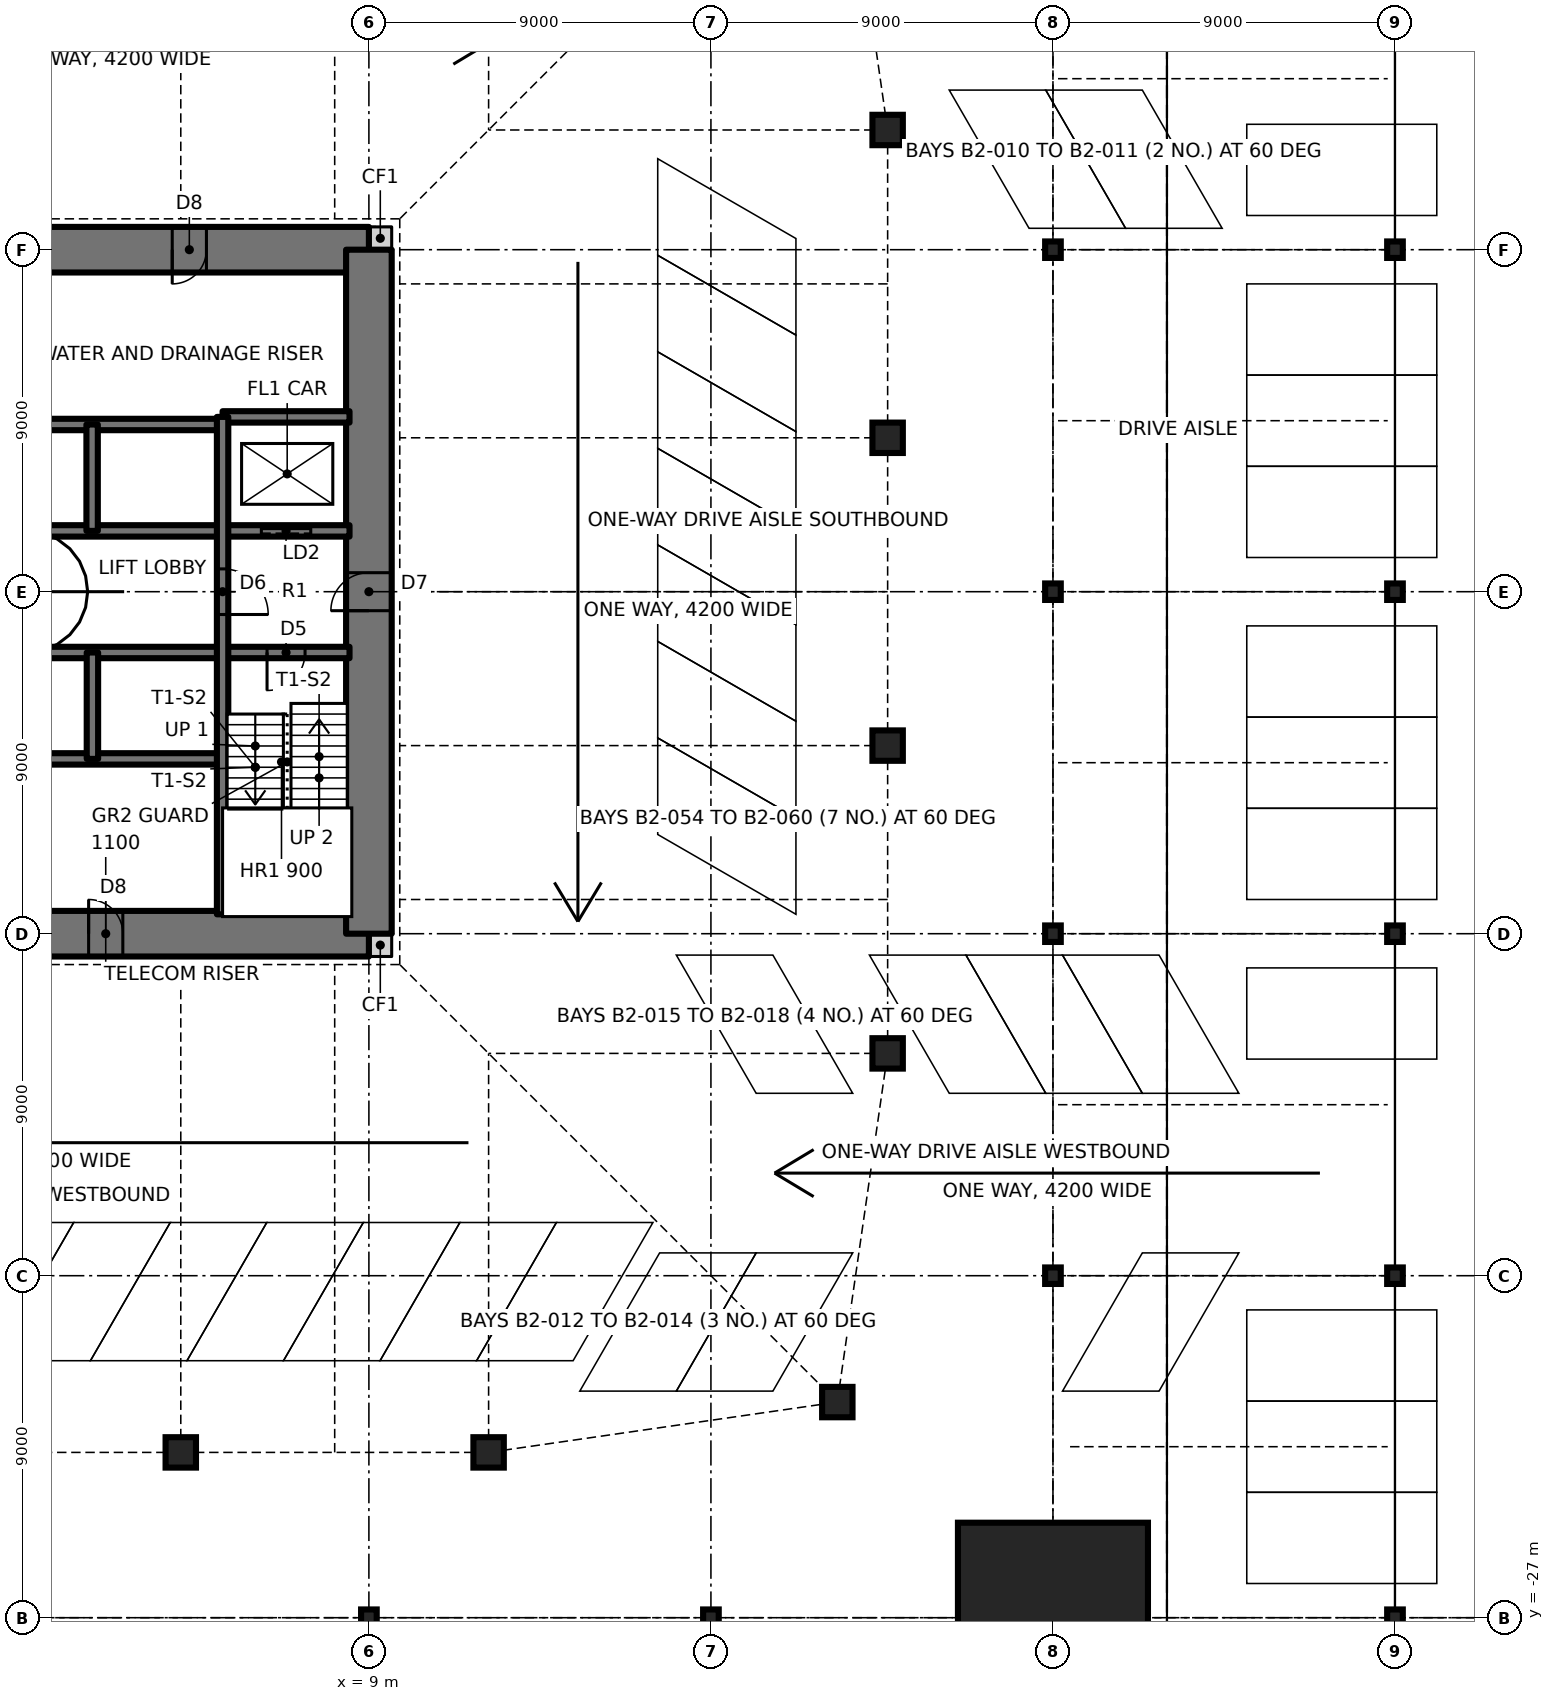
"""IFC4 building model, lengths in metres.
Left out: names, types, materials, properties, quantities, classifications, styles, units other than length and angle.
Written with IfcOpenShell. Run it as: python <this file> out.ifc"""

import sys

from ifc_helpers import new_model, si_unit, direction, frame, frame_2d, origin, origin_2d, place, context, subcontext, project, spatial, rectangle, hollow_rectangle, i_section, extrude, element, fill, save


model = new_model("IFC4")
c1 = context("Model", 3, precision=1e-05, world=origin(), true_north=direction((0.0, 1.0)))
c2 = subcontext(c1, "Body", "Model", "MODEL_VIEW")
j1 = project(units=[si_unit("LENGTHUNIT", "METRE"), si_unit("PLANEANGLEUNIT", "RADIAN")], contexts=[c1])
p1 = place(None, origin())
s1 = spatial("IfcSite", under=j1, at=p1, CompositionType="ELEMENT")
p2 = place(p1, origin())
s2 = spatial("IfcBuilding", under=s1, at=p2, CompositionType="ELEMENT")
p3 = place(p2, frame((0.0, 0.0, -7.2)))
s3 = spatial("IfcBuildingStorey", under=s2, at=p3, CompositionType="ELEMENT", Elevation=-7.2)
for number, where, z_axis, x_axis in (
    (1, (4.05, -22.65, -1.8), (0.0, 0.0, 1.0), (1.0, 0.0, 0.0)),
    (2, (12.15, -22.65, -1.8), (0.0, 0.0, 1.0), (1.0, 0.0, 0.0)),
    (3, (21.326, -21.326, -1.8), (0.0, 0.0, 1.0), (1.0, 0.0, 0.0)),
    (4, (22.65, -12.15, -1.8), (0.0, 0.0, 1.0), (1.0, 0.0, 0.0)),
    (5, (22.65, -4.05, -1.8), (0.0, 0.0, 1.0), (1.0, 0.0, 0.0)),
    (6, (22.65, 4.05, -1.8), (0.0, 0.0, 1.0), (1.0, 0.0, 0.0)),
    (7, (22.65, 12.15, -1.8), (0.0, 0.0, 1.0), (1.0, 0.0, 0.0)),
):
    element("IfcColumn", number, at=place(p3, frame(where, z_axis=z_axis, x_axis=x_axis)), inside=s3, PredefinedType="COLUMN", context=c2, shape_type="SweptSolid", body=[
        extrude(hollow_rectangle(XDim=0.8, YDim=0.8, WallThickness=0.09, at=origin_2d()), origin(), (0.0, 0.0, 1.0), 5.4),
    ])
p4 = place(p3, frame((27.0, -27.0, -1.8), z_axis=(0.0, 0.0, 1.0), x_axis=(1.0, 0.0, 0.0)))
e8 = element("IfcColumn", 8, at=p4, inside=s3, PredefinedType="COLUMN", context=c2, shape_type="SweptSolid", body=[
    extrude(rectangle(XDim=5.0, YDim=5.0, at=origin_2d()), origin(), (0.0, 0.0, 1.0), 5.4),
    extrude(i_section(OverallWidth=0.478, OverallDepth=0.599, WebThickness=0.1, FlangeThickness=0.14, at=origin_2d()), origin(), (0.0, 0.0, 1.0), 5.4),
])
for number, where, z_axis, x_axis in (
    (9, (9.0, -27.0, -1.8), (0.0, 0.0, 1.0), (1.0, 0.0, 0.0)),
    (10, (18.0, -27.0, -1.8), (0.0, 0.0, 1.0), (1.0, 0.0, 0.0)),
    (11, (27.0, -18.0, -1.8), (0.0, 0.0, 1.0), (1.0, 0.0, 0.0)),
    (12, (27.0, -9.0, -1.8), (0.0, 0.0, 1.0), (1.0, 0.0, 0.0)),
    (13, (27.0, 0.0, -1.8), (0.0, 0.0, 1.0), (1.0, 0.0, 0.0)),
    (14, (27.0, 9.0, -1.8), (0.0, 0.0, 1.0), (1.0, 0.0, 0.0)),
):
    element("IfcColumn", number, at=place(p3, frame(where, z_axis=z_axis, x_axis=x_axis)), inside=s3, PredefinedType="COLUMN", context=c2, shape_type="SweptSolid", body=[
        extrude(i_section(OverallWidth=0.411, OverallDepth=0.434, WebThickness=0.036, FlangeThickness=0.057, at=origin_2d()), origin(), (0.0, 0.0, 1.0), 5.4),
    ])
for number, where, z_axis, x_axis in (
    (15, (36.0, -27.0, -0.25), (0.0, 0.0, 1.0), (1.0, 0.0, 0.0)),
    (16, (36.0, -18.0, -0.25), (0.0, 0.0, 1.0), (1.0, 0.0, 0.0)),
    (17, (36.0, -9.0, -0.25), (0.0, 0.0, 1.0), (1.0, 0.0, 0.0)),
    (18, (36.0, 0.0, -0.25), (0.0, 0.0, 1.0), (1.0, 0.0, 0.0)),
    (19, (36.0, 9.0, -0.25), (0.0, 0.0, 1.0), (1.0, 0.0, 0.0)),
):
    element("IfcColumn", number, at=place(p3, frame(where, z_axis=z_axis, x_axis=x_axis)), inside=s3, PredefinedType="COLUMN", context=c2, shape_type="SweptSolid", body=[
        extrude(i_section(OverallWidth=0.411, OverallDepth=0.434, WebThickness=0.036, FlangeThickness=0.057, at=origin_2d()), origin(), (0.0, 0.0, 1.0), 3.85),
    ])
for number, where, z_axis, x_axis in (
    (20, (9.0, -9.3, -1.8), (0.0, 0.0, 1.0), (1.0, 0.0, 0.0)),
    (21, (9.0, 9.3, -1.8), (0.0, 0.0, 1.0), (1.0, 0.0, 0.0)),
):
    element("IfcWall", number, at=place(p3, frame(where, z_axis=z_axis, x_axis=x_axis)), inside=s3, PredefinedType="SOLIDWALL", context=c2, shape_type="SweptSolid", body=[
        extrude(rectangle(XDim=0.6, YDim=0.6, at=frame_2d((0.3, 0.0))), origin(), (0.0, 0.0, 1.0), 5.4),
    ])
p5 = place(p3, frame((-9.0, -9.0, -1.8), z_axis=(0.0, 0.0, 1.0), x_axis=(1.0, 0.0, 0.0)))
e22 = element("IfcWall", 22, at=p5, inside=s3, PredefinedType="SHEAR", context=c2, shape_type="SweptSolid", body=[
    extrude(rectangle(XDim=18.0, YDim=1.2, at=frame_2d((9.0, 0.0))), origin(), (0.0, 0.0, 1.0), 5.4),
])
p6 = place(p5, frame((3.775, 0.0, 1.8)))
e23 = element("IfcOpeningElement", 23, at=p6, cuts=e22, PredefinedType="OPENING", context=c2, shape_type="SweptSolid", body=[
    extrude(rectangle(XDim=0.9, YDim=2.1, at=frame_2d((0.45, 1.05))), frame((0.0, 0.61, 0.0), z_axis=(0.0, -1.0, 0.0), x_axis=(1.0, 0.0, 0.0)), (0.0, 0.0, 1.0), 1.22),
])
p7 = place(p5, frame((10.625, 0.0, 1.8)))
e24 = element("IfcOpeningElement", 24, at=p7, cuts=e22, PredefinedType="OPENING", context=c2, shape_type="SweptSolid", body=[
    extrude(rectangle(XDim=0.9, YDim=2.1, at=frame_2d((0.45, 1.05))), frame((0.0, 0.61, 0.0), z_axis=(0.0, -1.0, 0.0), x_axis=(1.0, 0.0, 0.0)), (0.0, 0.0, 1.0), 1.22),
])
p8 = place(p3, frame((9.0, 9.0, -1.8), z_axis=(0.0, 0.0, 1.0), x_axis=(-1.0, 0.0, 0.0)))
e25 = element("IfcWall", 25, at=p8, inside=s3, PredefinedType="SHEAR", context=c2, shape_type="SweptSolid", body=[
    extrude(rectangle(XDim=18.0, YDim=1.2, at=frame_2d((9.0, 0.0))), origin(), (0.0, 0.0, 1.0), 5.4),
])
p9 = place(p8, frame((11.125, 0.0, 1.8)))
e26 = element("IfcOpeningElement", 26, at=p9, cuts=e25, PredefinedType="OPENING", context=c2, shape_type="SweptSolid", body=[
    extrude(rectangle(XDim=0.9, YDim=2.1, at=frame_2d((0.45, 1.05))), frame((0.0, 0.61, 0.0), z_axis=(0.0, -1.0, 0.0), x_axis=(1.0, 0.0, 0.0)), (0.0, 0.0, 1.0), 1.22),
])
p10 = place(p8, frame((4.275, 0.0, 1.8)))
e27 = element("IfcOpeningElement", 27, at=p10, cuts=e25, PredefinedType="OPENING", context=c2, shape_type="SweptSolid", body=[
    extrude(rectangle(XDim=0.9, YDim=2.1, at=frame_2d((0.45, 1.05))), frame((0.0, 0.61, 0.0), z_axis=(0.0, -1.0, 0.0), x_axis=(1.0, 0.0, 0.0)), (0.0, 0.0, 1.0), 1.22),
])
p11 = place(p3, frame((9.0, -9.0, -1.8), z_axis=(0.0, 0.0, 1.0), x_axis=(0.0, 1.0, 0.0)))
e28 = element("IfcWall", 28, at=p11, inside=s3, PredefinedType="SHEAR", context=c2, shape_type="SweptSolid", body=[
    extrude(rectangle(XDim=18.0, YDim=1.2, at=frame_2d((9.0, 0.0))), origin(), (0.0, 0.0, 1.0), 5.4),
])
p12 = place(p11, frame((8.5, 0.0, 1.8)))
e29 = element("IfcOpeningElement", 29, at=p12, cuts=e28, PredefinedType="OPENING", context=c2, shape_type="SweptSolid", body=[
    extrude(rectangle(XDim=1.0, YDim=2.1, at=frame_2d((0.5, 1.05))), frame((0.0, 0.61, 0.0), z_axis=(0.0, -1.0, 0.0), x_axis=(1.0, 0.0, 0.0)), (0.0, 0.0, 1.0), 1.22),
])
p13 = place(p3, frame((29.775, -29.55, -1.8), z_axis=(0.0, 0.0, 1.0), x_axis=(0.0, 1.0, 0.0)))
e30 = element("IfcWall", 30, at=p13, inside=s3, PredefinedType="SOLIDWALL", context=c2, shape_type="SweptSolid", body=[
    extrude(rectangle(XDim=59.1, YDim=0.45, at=frame_2d((29.55, 0.0))), origin(), (0.0, 0.0, 1.0), 1.5),
])
p14 = place(p3, frame((-24.5, -27.0, -1.8), z_axis=(0.0, 0.0, 1.0), x_axis=(1.0, 0.0, 0.0)))
e31 = element("IfcWall", 31, at=p14, inside=s3, PredefinedType="SOLIDWALL", context=c2, shape_type="SweptSolid", body=[
    extrude(rectangle(XDim=49.0, YDim=0.45, at=frame_2d((24.5, 0.0))), origin(), (0.0, 0.0, 1.0), 1.5),
])
p15 = place(p3, frame((-29.55, -18.0, -1.8), z_axis=(0.0, 0.0, 1.0), x_axis=(1.0, 0.0, 0.0)))
e32 = element("IfcWall", 32, at=p15, inside=s3, PredefinedType="SOLIDWALL", context=c2, shape_type="SweptSolid", body=[
    extrude(rectangle(XDim=59.1, YDim=0.45, at=frame_2d((29.55, 0.0))), origin(), (0.0, 0.0, 1.0), 1.5),
])
for number, where, z_axis, x_axis in (
    (33, (9.6, -9.0, -1.8), (0.0, 0.0, 1.0), (1.0, 0.0, 0.0)),
    (34, (9.6, 0.0, -1.8), (0.0, 0.0, 1.0), (1.0, 0.0, 0.0)),
    (35, (9.6, 9.0, -1.8), (0.0, 0.0, 1.0), (1.0, 0.0, 0.0)),
):
    element("IfcWall", number, at=place(p3, frame(where, z_axis=z_axis, x_axis=x_axis)), inside=s3, PredefinedType="SOLIDWALL", context=c2, shape_type="SweptSolid", body=[
        extrude(rectangle(XDim=19.95, YDim=0.45, at=frame_2d((9.975, 0.0))), origin(), (0.0, 0.0, 1.0), 1.5),
    ])
p16 = place(p3, frame((9.0, -26.775, -1.8), z_axis=(0.0, 0.0, 1.0), x_axis=(0.0, 1.0, 0.0)))
e36 = element("IfcWall", 36, at=p16, inside=s3, PredefinedType="SOLIDWALL", context=c2, shape_type="SweptSolid", body=[
    extrude(rectangle(XDim=8.55, YDim=0.45, at=frame_2d((4.275, 0.0))), origin(), (0.0, 0.0, 1.0), 1.5),
])
for number, where, z_axis, x_axis in (
    (37, (9.0, -17.775, -1.8), (0.0, 0.0, 1.0), (0.0, 1.0, 0.0)),
    (38, (9.0, 9.6, -1.8), (0.0, 0.0, 1.0), (0.0, 1.0, 0.0)),
):
    element("IfcWall", number, at=place(p3, frame(where, z_axis=z_axis, x_axis=x_axis)), inside=s3, PredefinedType="SOLIDWALL", context=c2, shape_type="SweptSolid", body=[
        extrude(rectangle(XDim=8.175, YDim=0.45, at=frame_2d((4.087, 0.0))), origin(), (0.0, 0.0, 1.0), 1.5),
    ])
for number, where, z_axis, x_axis in (
    (39, (18.0, -26.775, -1.8), (0.0, 0.0, 1.0), (0.0, 1.0, 0.0)),
    (40, (18.0, -17.775, -1.8), (0.0, 0.0, 1.0), (0.0, 1.0, 0.0)),
    (41, (18.0, -8.775, -1.8), (0.0, 0.0, 1.0), (0.0, 1.0, 0.0)),
    (42, (18.0, 0.225, -1.8), (0.0, 0.0, 1.0), (0.0, 1.0, 0.0)),
    (43, (18.0, 9.225, -1.8), (0.0, 0.0, 1.0), (0.0, 1.0, 0.0)),
):
    element("IfcWall", number, at=place(p3, frame(where, z_axis=z_axis, x_axis=x_axis)), inside=s3, PredefinedType="SOLIDWALL", context=c2, shape_type="SweptSolid", body=[
        extrude(rectangle(XDim=8.55, YDim=0.45, at=frame_2d((4.275, 0.0))), origin(), (0.0, 0.0, 1.0), 1.5),
    ])
p17 = place(p3, frame((27.0, -24.5, -1.8), z_axis=(0.0, 0.0, 1.0), x_axis=(0.0, 1.0, 0.0)))
e44 = element("IfcWall", 44, at=p17, inside=s3, PredefinedType="SOLIDWALL", context=c2, shape_type="SweptSolid", body=[
    extrude(rectangle(XDim=6.275, YDim=0.45, at=frame_2d((3.137, 0.0))), origin(), (0.0, 0.0, 1.0), 1.5),
])
for number, where, z_axis, x_axis in (
    (45, (27.0, -17.775, -1.8), (0.0, 0.0, 1.0), (0.0, 1.0, 0.0)),
    (46, (27.0, -8.775, -1.8), (0.0, 0.0, 1.0), (0.0, 1.0, 0.0)),
    (47, (27.0, 0.225, -1.8), (0.0, 0.0, 1.0), (0.0, 1.0, 0.0)),
    (48, (27.0, 9.225, -1.8), (0.0, 0.0, 1.0), (0.0, 1.0, 0.0)),
):
    element("IfcWall", number, at=place(p3, frame(where, z_axis=z_axis, x_axis=x_axis)), inside=s3, PredefinedType="SOLIDWALL", context=c2, shape_type="SweptSolid", body=[
        extrude(rectangle(XDim=8.55, YDim=0.45, at=frame_2d((4.275, 0.0))), origin(), (0.0, 0.0, 1.0), 1.5),
    ])
p18 = place(p3, frame((-8.49, -4.4, -1.8), z_axis=(0.0, 0.0, 1.0), x_axis=(1.0, 0.0, 0.0)))
e49 = element("IfcWall", 49, at=p18, inside=s3, PredefinedType="SOLIDWALL", context=c2, shape_type="SweptSolid", body=[
    extrude(rectangle(XDim=13.64, YDim=0.3, at=frame_2d((6.82, 0.0))), origin(), (0.0, 0.0, 1.0), 5.4),
])
p19 = place(p3, frame((-8.49, -1.6, -1.8), z_axis=(0.0, 0.0, 1.0), x_axis=(1.0, 0.0, 0.0)))
e50 = element("IfcWall", 50, at=p19, inside=s3, PredefinedType="SOLIDWALL", context=c2, shape_type="SweptSolid", body=[
    extrude(rectangle(XDim=16.98, YDim=0.3, at=frame_2d((8.49, 0.0))), origin(), (0.0, 0.0, 1.0), 5.4),
])
p20 = place(p19, frame((14.81, 0.0, 1.8)))
e51 = element("IfcOpeningElement", 51, at=p20, cuts=e50, PredefinedType="OPENING", context=c2, shape_type="SweptSolid", body=[
    extrude(rectangle(XDim=1.0, YDim=2.1, at=frame_2d((0.5, 1.05))), frame((0.0, 0.16, 0.0), z_axis=(0.0, -1.0, 0.0), x_axis=(1.0, 0.0, 0.0)), (0.0, 0.0, 1.0), 0.32),
])
p21 = place(p19, frame((1.133, 0.0, 1.8)))
e52 = element("IfcOpeningElement", 52, at=p21, cuts=e50, PredefinedType="OPENING", context=c2, shape_type="SweptSolid", body=[
    extrude(rectangle(XDim=1.1, YDim=2.1, at=frame_2d((0.55, 1.05))), frame((0.0, 0.16, 0.0), z_axis=(0.0, -1.0, 0.0), x_axis=(1.0, 0.0, 0.0)), (0.0, 0.0, 1.0), 0.32),
])
p22 = place(p19, frame((4.528, 0.0, 1.8)))
e53 = element("IfcOpeningElement", 53, at=p22, cuts=e50, PredefinedType="OPENING", context=c2, shape_type="SweptSolid", body=[
    extrude(rectangle(XDim=1.1, YDim=2.1, at=frame_2d((0.55, 1.05))), frame((0.0, 0.16, 0.0), z_axis=(0.0, -1.0, 0.0), x_axis=(1.0, 0.0, 0.0)), (0.0, 0.0, 1.0), 0.32),
])
p23 = place(p3, frame((-8.49, 1.6, -1.8), z_axis=(0.0, 0.0, 1.0), x_axis=(1.0, 0.0, 0.0)))
e54 = element("IfcWall", 54, at=p23, inside=s3, PredefinedType="SOLIDWALL", context=c2, shape_type="SweptSolid", body=[
    extrude(rectangle(XDim=16.98, YDim=0.3, at=frame_2d((8.49, 0.0))), origin(), (0.0, 0.0, 1.0), 5.4),
])
p24 = place(p23, frame((1.17, 0.0, 1.8)))
e55 = element("IfcOpeningElement", 55, at=p24, cuts=e54, PredefinedType="OPENING", context=c2, shape_type="SweptSolid", body=[
    extrude(rectangle(XDim=1.0, YDim=2.1, at=frame_2d((0.5, 1.05))), frame((0.0, 0.16, 0.0), z_axis=(0.0, -1.0, 0.0), x_axis=(1.0, 0.0, 0.0)), (0.0, 0.0, 1.0), 0.32),
])
p25 = place(p23, frame((14.66, 0.0, 1.8)))
e56 = element("IfcOpeningElement", 56, at=p25, cuts=e54, PredefinedType="OPENING", context=c2, shape_type="SweptSolid", body=[
    extrude(rectangle(XDim=1.3, YDim=2.1, at=frame_2d((0.65, 1.05))), frame((0.0, 0.16, 0.0), z_axis=(0.0, -1.0, 0.0), x_axis=(1.0, 0.0, 0.0)), (0.0, 0.0, 1.0), 0.32),
])
p26 = place(p3, frame((-5.15, 4.4, -1.8), z_axis=(0.0, 0.0, 1.0), x_axis=(1.0, 0.0, 0.0)))
e57 = element("IfcWall", 57, at=p26, inside=s3, PredefinedType="SOLIDWALL", context=c2, shape_type="SweptSolid", body=[
    extrude(rectangle(XDim=10.3, YDim=0.3, at=frame_2d((5.15, 0.0))), origin(), (0.0, 0.0, 1.0), 5.4),
])
p27 = place(p3, frame((5.15, 4.6, -1.8), z_axis=(0.0, 0.0, 1.0), x_axis=(1.0, 0.0, 0.0)))
e58 = element("IfcWall", 58, at=p27, inside=s3, PredefinedType="SOLIDWALL", context=c2, shape_type="SweptSolid", body=[
    extrude(rectangle(XDim=3.34, YDim=0.3, at=frame_2d((1.67, 0.0))), origin(), (0.0, 0.0, 1.0), 5.4),
])
p28 = place(p3, frame((5.15, -8.49, -1.8), z_axis=(0.0, 0.0, 1.0), x_axis=(0.0, 1.0, 0.0)))
e59 = element("IfcWall", 59, at=p28, inside=s3, PredefinedType="SOLIDWALL", context=c2, shape_type="SweptSolid", body=[
    extrude(rectangle(XDim=13.09, YDim=0.3, at=frame_2d((6.545, 0.0))), origin(), (0.0, 0.0, 1.0), 5.4),
])
p29 = place(p28, frame((7.89, 0.0, 1.8)))
e60 = element("IfcOpeningElement", 60, at=p29, cuts=e59, PredefinedType="OPENING", context=c2, shape_type="SweptSolid", body=[
    extrude(rectangle(XDim=1.2, YDim=2.1, at=frame_2d((0.6, 1.05))), frame((0.0, 0.16, 0.0), z_axis=(0.0, -1.0, 0.0), x_axis=(1.0, 0.0, 0.0)), (0.0, 0.0, 1.0), 0.32),
])
for number, where, z_axis, x_axis in (
    (61, (1.725, -4.4, -1.8), (0.0, 0.0, 1.0), (0.0, 1.0, 0.0)),
    (62, (1.717, 1.6, -1.8), (0.0, 0.0, 1.0), (0.0, 1.0, 0.0)),
):
    element("IfcWall", number, at=place(p3, frame(where, z_axis=z_axis, x_axis=x_axis)), inside=s3, PredefinedType="SOLIDWALL", context=c2, shape_type="SweptSolid", body=[
        extrude(rectangle(XDim=2.8, YDim=0.3, at=frame_2d((1.4, 0.0))), origin(), (0.0, 0.0, 1.0), 5.4),
    ])
p30 = place(p20, frame((1.0, 0.0, 0.0), z_axis=(0.0, 0.0, 1.0), x_axis=(-1.0, 0.0, 0.0)))
e63 = element("IfcDoor", 63, at=p30, inside=s3, OperationType="SINGLE_SWING_RIGHT", PredefinedType="DOOR", context=c2, shape_type="SweptSolid", body=[
    extrude(rectangle(XDim=1.0, YDim=2.1, at=frame_2d((0.5, 1.05))), frame((0.0, 0.025, 0.0), z_axis=(0.0, -1.0, 0.0), x_axis=(1.0, 0.0, 0.0)), (0.0, 0.0, 1.0), 0.05),
])
fill(e51, e63)
p31 = place(p29, frame((1.2, 0.0, 0.0), z_axis=(0.0, 0.0, 1.0), x_axis=(-1.0, 0.0, 0.0)))
e64 = element("IfcDoor", 64, at=p31, inside=s3, OperationType="SINGLE_SWING_RIGHT", PredefinedType="DOOR", context=c2, shape_type="SweptSolid", body=[
    extrude(rectangle(XDim=1.2, YDim=2.1, at=frame_2d((0.6, 1.05))), frame((0.0, 0.025, 0.0), z_axis=(0.0, -1.0, 0.0), x_axis=(1.0, 0.0, 0.0)), (0.0, 0.0, 1.0), 0.05),
])
fill(e60, e64)
p32 = place(p12, origin())
e65 = element("IfcDoor", 65, at=p32, inside=s3, OperationType="SINGLE_SWING_LEFT", PredefinedType="DOOR", context=c2, shape_type="SweptSolid", body=[
    extrude(rectangle(XDim=1.0, YDim=2.1, at=frame_2d((0.5, 1.05))), frame((0.0, 0.025, 0.0), z_axis=(0.0, -1.0, 0.0), x_axis=(1.0, 0.0, 0.0)), (0.0, 0.0, 1.0), 0.05),
])
fill(e29, e65)
p33 = place(p10, origin())
e66 = element("IfcDoor", 66, at=p33, inside=s3, OperationType="SINGLE_SWING_RIGHT", PredefinedType="DOOR", context=c2, shape_type="SweptSolid", body=[
    extrude(rectangle(XDim=0.9, YDim=2.1, at=frame_2d((0.45, 1.05))), frame((0.0, 0.025, 0.0), z_axis=(0.0, -1.0, 0.0), x_axis=(1.0, 0.0, 0.0)), (0.0, 0.0, 1.0), 0.05),
])
fill(e27, e66)
p34 = place(p7, origin())
e67 = element("IfcDoor", 67, at=p34, inside=s3, OperationType="SINGLE_SWING_LEFT", PredefinedType="DOOR", context=c2, shape_type="SweptSolid", body=[
    extrude(rectangle(XDim=0.9, YDim=2.1, at=frame_2d((0.45, 1.05))), frame((0.0, 0.025, 0.0), z_axis=(0.0, -1.0, 0.0), x_axis=(1.0, 0.0, 0.0)), (0.0, 0.0, 1.0), 0.05),
])
fill(e24, e67)
p35 = place(p25, origin())
e68 = element("IfcDoor", 68, at=p35, inside=s3, OperationType="SLIDING_TO_LEFT", PredefinedType="DOOR", context=c2, shape_type="SweptSolid", body=[
    extrude(rectangle(XDim=1.3, YDim=2.1, at=frame_2d((0.65, 1.05))), frame((0.0, 0.025, 0.0), z_axis=(0.0, -1.0, 0.0), x_axis=(1.0, 0.0, 0.0)), (0.0, 0.0, 1.0), 0.05),
])
fill(e56, e68)
save(model, sys.argv[1])
